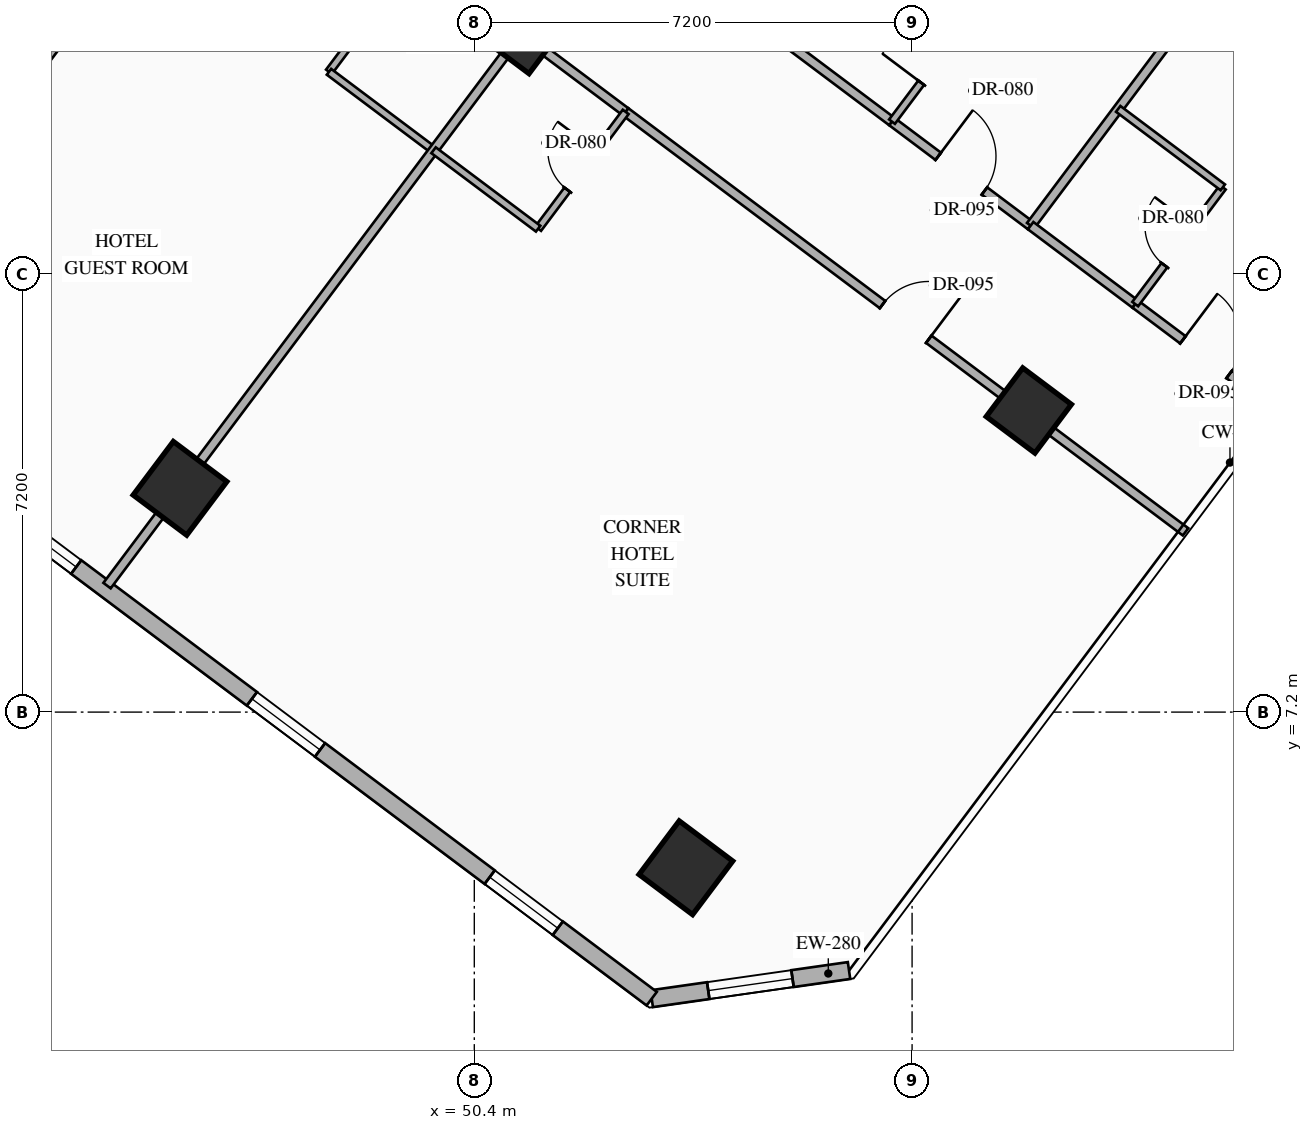
"""IFC4 building model, lengths in metres.
Left out: names, types, materials, properties, quantities, classifications, styles, units other than length and angle.
Written with IfcOpenShell. Run it as: python <this file> out.ifc"""

import sys

from ifc_helpers import new_model, si_unit, direction, frame, frame_2d, origin, origin_2d, place, context, subcontext, project, spatial, rectangle, hollow_rectangle, extrude, element, fill, save


model = new_model("IFC4")
c1 = context("Model", 3, precision=1e-05, world=origin(), true_north=direction((0.0, 1.0)))
c2 = subcontext(c1, "Body", "Model", "MODEL_VIEW")
j1 = project(units=[si_unit("LENGTHUNIT", "METRE"), si_unit("PLANEANGLEUNIT", "RADIAN")], contexts=[c1])
p1 = place(None, origin())
s1 = spatial("IfcSite", under=j1, at=p1, CompositionType="ELEMENT")
p2 = place(p1, origin())
s2 = spatial("IfcBuilding", under=s1, at=p2, CompositionType="ELEMENT")
p3 = place(p2, frame((0.0, 0.0, 56.7)))
s3 = spatial("IfcBuildingStorey", under=s2, at=p3, CompositionType="ELEMENT", Elevation=56.7)
p4 = place(p3, frame((45.56, 10.88, 0.0), z_axis=(0.0, 0.0, 1.0), x_axis=(0.799999996291, -0.600000004945, 0.0)))
e1 = element("IfcColumn", 1, at=p4, inside=s3, PredefinedType="COLUMN", context=c2, shape_type="SweptSolid", body=[
    extrude(hollow_rectangle(XDim=1.1, YDim=1.1, WallThickness=0.04, at=origin_2d()), origin(), (0.0, 0.0, 1.0), 3.35),
])
p5 = place(p3, frame((51.2, 18.4, 0.0), z_axis=(0.0, 0.0, 1.0), x_axis=(0.799999996291, -0.600000004945, 0.0)))
e2 = element("IfcColumn", 2, at=p5, inside=s3, PredefinedType="COLUMN", context=c2, shape_type="SweptSolid", body=[
    extrude(hollow_rectangle(XDim=1.0, YDim=1.0, WallThickness=0.038, at=origin_2d()), origin(), (0.0, 0.0, 1.0), 3.35),
])
p6 = place(p3, frame((53.88, 4.64, 0.0), z_axis=(0.0, 0.0, 1.0), x_axis=(0.799999996291, -0.600000004945, 0.0)))
e3 = element("IfcColumn", 3, at=p6, inside=s3, PredefinedType="COLUMN", context=c2, shape_type="SweptSolid", body=[
    extrude(hollow_rectangle(XDim=1.1, YDim=1.1, WallThickness=0.04, at=origin_2d()), origin(), (0.0, 0.0, 1.0), 3.35),
])
p7 = place(p3, frame((59.52, 12.16, 0.0), z_axis=(0.0, 0.0, 1.0), x_axis=(0.799999996291, -0.600000004945, 0.0)))
e4 = element("IfcColumn", 4, at=p7, inside=s3, PredefinedType="COLUMN", context=c2, shape_type="SweptSolid", body=[
    extrude(hollow_rectangle(XDim=1.0, YDim=1.0, WallThickness=0.038, at=origin_2d()), origin(), (0.0, 0.0, 1.0), 3.35),
])
p8 = place(p3, frame((56.563, 2.95, 0.0), z_axis=(0.0, 0.0, 1.0), x_axis=(-0.989977778067, -0.141223223777, 0.0)))
e5 = element("IfcWall", 5, at=p8, inside=s3, PredefinedType="STANDARD", context=c2, shape_type="SweptSolid", body=[
    extrude(rectangle(XDim=3.278, YDim=0.28, at=frame_2d((1.639, 0.0))), origin(), (0.0, 0.0, 1.0), 3.13),
])
p9 = place(p8, frame((0.939, 0.0, 0.85)))
e6 = element("IfcOpeningElement", 6, at=p9, cuts=e5, PredefinedType="OPENING", context=c2, shape_type="SweptSolid", body=[
    extrude(rectangle(XDim=1.4, YDim=1.8, at=frame_2d((0.7, 0.9))), frame((0.0, 0.15, 0.0), z_axis=(0.0, -1.0, 0.0), x_axis=(1.0, 0.0, 0.0)), (0.0, 0.0, 1.0), 0.3),
])
p10 = place(p3, frame((53.318, 2.487, 0.0), z_axis=(0.0, 0.0, 1.0), x_axis=(-0.800004174678, 0.599994433723, 0.0)))
e7 = element("IfcWall", 7, at=p10, inside=s3, PredefinedType="STANDARD", context=c2, shape_type="SweptSolid", body=[
    extrude(rectangle(XDim=35.089, YDim=0.28, at=frame_2d((17.544, 0.0))), origin(), (0.0, 0.0, 1.0), 3.13),
])
p11 = place(p10, frame((1.931, 0.0, 0.85)))
e8 = element("IfcOpeningElement", 8, at=p11, cuts=e7, PredefinedType="OPENING", context=c2, shape_type="SweptSolid", body=[
    extrude(rectangle(XDim=1.4, YDim=1.8, at=frame_2d((0.7, 0.9))), frame((0.0, 0.15, 0.0), z_axis=(0.0, -1.0, 0.0), x_axis=(1.0, 0.0, 0.0)), (0.0, 0.0, 1.0), 0.3),
])
p12 = place(p10, frame((6.819, 0.0, 0.85)))
e9 = element("IfcOpeningElement", 9, at=p12, cuts=e7, PredefinedType="OPENING", context=c2, shape_type="SweptSolid", body=[
    extrude(rectangle(XDim=1.4, YDim=1.8, at=frame_2d((0.7, 0.9))), frame((0.0, 0.15, 0.0), z_axis=(0.0, -1.0, 0.0), x_axis=(1.0, 0.0, 0.0)), (0.0, 0.0, 1.0), 0.3),
])
p13 = place(p10, frame((11.832, 0.0, 0.85)))
e10 = element("IfcOpeningElement", 10, at=p13, cuts=e7, PredefinedType="OPENING", context=c2, shape_type="SweptSolid", body=[
    extrude(rectangle(XDim=1.4, YDim=1.8, at=frame_2d((0.7, 0.9))), frame((0.0, 0.15, 0.0), z_axis=(0.0, -1.0, 0.0), x_axis=(1.0, 0.0, 0.0)), (0.0, 0.0, 1.0), 0.3),
])
p14 = place(p10, frame((17.647, 0.0, 0.85)))
e11 = element("IfcOpeningElement", 11, at=p14, cuts=e7, PredefinedType="OPENING", context=c2, shape_type="SweptSolid", body=[
    extrude(rectangle(XDim=1.4, YDim=1.8, at=frame_2d((0.7, 0.9))), frame((0.0, 0.15, 0.0), z_axis=(0.0, -1.0, 0.0), x_axis=(1.0, 0.0, 0.0)), (0.0, 0.0, 1.0), 0.3),
])
p15 = place(p10, frame((21.857, 0.0, 0.85)))
e12 = element("IfcOpeningElement", 12, at=p15, cuts=e7, PredefinedType="OPENING", context=c2, shape_type="SweptSolid", body=[
    extrude(rectangle(XDim=1.4, YDim=1.8, at=frame_2d((0.7, 0.9))), frame((0.0, 0.15, 0.0), z_axis=(0.0, -1.0, 0.0), x_axis=(1.0, 0.0, 0.0)), (0.0, 0.0, 1.0), 0.3),
])
p16 = place(p10, frame((26.87, 0.0, 0.85)))
e13 = element("IfcOpeningElement", 13, at=p16, cuts=e7, PredefinedType="OPENING", context=c2, shape_type="SweptSolid", body=[
    extrude(rectangle(XDim=1.4, YDim=1.8, at=frame_2d((0.7, 0.9))), frame((0.0, 0.15, 0.0), z_axis=(0.0, -1.0, 0.0), x_axis=(1.0, 0.0, 0.0)), (0.0, 0.0, 1.0), 0.3),
])
p17 = place(p10, frame((31.757, 0.0, 0.85)))
e14 = element("IfcOpeningElement", 14, at=p17, cuts=e7, PredefinedType="OPENING", context=c2, shape_type="SweptSolid", body=[
    extrude(rectangle(XDim=1.4, YDim=1.8, at=frame_2d((0.7, 0.9))), frame((0.0, 0.15, 0.0), z_axis=(0.0, -1.0, 0.0), x_axis=(1.0, 0.0, 0.0)), (0.0, 0.0, 1.0), 0.3),
])
p18 = place(p3, frame((39.464, 12.752, 0.0), z_axis=(0.0, 0.0, 1.0), x_axis=(0.6, 0.8, 0.0)))
e15 = element("IfcWall", 15, at=p18, inside=s3, PredefinedType="PARTITIONING", context=c2, shape_type="SweptSolid", body=[
    extrude(rectangle(XDim=11.51, YDim=0.15, at=frame_2d((5.755, 0.0))), origin(), (0.0, 0.0, 1.0), 3.13),
])
p19 = place(p3, frame((55.55, 18.2, 0.0), z_axis=(0.0, 0.0, 1.0), x_axis=(0.79998637334, -0.60001816845, 0.0)))
e16 = element("IfcWall", 16, at=p19, inside=s3, PredefinedType="PARTITIONING", context=c2, shape_type="SweptSolid", body=[
    extrude(rectangle(XDim=2.15, YDim=0.15, at=frame_2d((1.075, 0.0))), origin(), (0.0, 0.0, 1.0), 2.775),
])
p20 = place(p3, frame((57.27, 16.91, 0.0), z_axis=(0.0, 0.0, 1.0), x_axis=(0.800010279488, -0.599986293772, 0.0)))
e17 = element("IfcWall", 17, at=p20, inside=s3, PredefinedType="PARTITIONING", context=c2, shape_type="SweptSolid", body=[
    extrude(rectangle(XDim=2.85, YDim=0.15, at=frame_2d((1.425, 0.0))), origin(), (0.0, 0.0, 1.0), 2.775),
])
p21 = place(p20, frame((0.95, 0.0, 0.0)))
e18 = element("IfcOpeningElement", 18, at=p21, cuts=e17, PredefinedType="OPENING", context=c2, shape_type="SweptSolid", body=[
    extrude(rectangle(XDim=0.95, YDim=2.15, at=frame_2d((0.475, 1.075))), frame((0.0, 0.085, 0.0), z_axis=(0.0, -1.0, 0.0), x_axis=(1.0, 0.0, 0.0)), (0.0, 0.0, 1.0), 0.17),
])
p22 = place(p3, frame((57.27, 16.91, 0.0), z_axis=(0.0, 0.0, 1.0), x_axis=(0.599951172744, 0.800036618114, 0.0)))
e19 = element("IfcWall", 19, at=p22, inside=s3, PredefinedType="PARTITIONING", context=c2, shape_type="SweptSolid", body=[
    extrude(rectangle(XDim=2.4, YDim=0.12, at=frame_2d((1.2, 0.0))), origin(), (0.0, 0.0, 1.0), 3.13),
])
p23 = place(p22, frame((0.8, 0.0, 0.0)))
e20 = element("IfcOpeningElement", 20, at=p23, cuts=e19, PredefinedType="OPENING", context=c2, shape_type="SweptSolid", body=[
    extrude(rectangle(XDim=0.8, YDim=2.06, at=frame_2d((0.4, 1.03))), frame((0.0, 0.07, 0.0), z_axis=(0.0, -1.0, 0.0), x_axis=(1.0, 0.0, 0.0)), (0.0, 0.0, 1.0), 0.14),
])
p24 = place(p3, frame((59.55, 15.2, 0.0), z_axis=(0.0, 0.0, 1.0), x_axis=(0.599996617946, 0.80000253653, 0.0)))
e21 = element("IfcWall", 21, at=p24, inside=s3, PredefinedType="PARTITIONING", context=c2, shape_type="SweptSolid", body=[
    extrude(rectangle(XDim=11.55, YDim=0.15, at=frame_2d((5.775, 0.0))), origin(), (0.0, 0.0, 1.0), 3.13),
])
p25 = place(p3, frame((59.55, 15.2, 0.0), z_axis=(0.0, 0.0, 1.0), x_axis=(0.79998637334, -0.60001816845, 0.0)))
e22 = element("IfcWall", 22, at=p25, inside=s3, PredefinedType="PARTITIONING", context=c2, shape_type="SweptSolid", body=[
    extrude(rectangle(XDim=2.15, YDim=0.15, at=frame_2d((1.075, 0.0))), origin(), (0.0, 0.0, 1.0), 2.775),
])
p26 = place(p3, frame((61.27, 13.91, 0.0), z_axis=(0.0, 0.0, 1.0), x_axis=(0.800010068184, -0.59998657552, 0.0)))
e23 = element("IfcWall", 23, at=p26, inside=s3, PredefinedType="PARTITIONING", context=c2, shape_type="SweptSolid", body=[
    extrude(rectangle(XDim=2.91, YDim=0.15, at=frame_2d((1.455, 0.0))), origin(), (0.0, 0.0, 1.0), 3.13),
])
p27 = place(p26, frame((0.98, 0.0, 0.0)))
e24 = element("IfcOpeningElement", 24, at=p27, cuts=e23, PredefinedType="OPENING", context=c2, shape_type="SweptSolid", body=[
    extrude(rectangle(XDim=0.95, YDim=2.15, at=frame_2d((0.475, 1.075))), frame((0.0, 0.085, 0.0), z_axis=(0.0, -1.0, 0.0), x_axis=(1.0, 0.0, 0.0)), (0.0, 0.0, 1.0), 0.17),
])
p28 = place(p3, frame((61.27, 13.91, 0.0), z_axis=(0.0, 0.0, 1.0), x_axis=(0.599951172744, 0.800036618114, 0.0)))
e25 = element("IfcWall", 25, at=p28, inside=s3, PredefinedType="PARTITIONING", context=c2, shape_type="SweptSolid", body=[
    extrude(rectangle(XDim=2.4, YDim=0.12, at=frame_2d((1.2, 0.0))), origin(), (0.0, 0.0, 1.0), 3.13),
])
p29 = place(p28, frame((0.8, 0.0, 0.0)))
e26 = element("IfcOpeningElement", 26, at=p29, cuts=e25, PredefinedType="OPENING", context=c2, shape_type="SweptSolid", body=[
    extrude(rectangle(XDim=0.8, YDim=2.06, at=frame_2d((0.4, 1.03))), frame((0.0, 0.07, 0.0), z_axis=(0.0, -1.0, 0.0), x_axis=(1.0, 0.0, 0.0)), (0.0, 0.0, 1.0), 0.14),
])
p30 = place(p3, frame((60.99, 17.12, 0.0), z_axis=(0.0, 0.0, 1.0), x_axis=(0.79998637334, -0.60001816845, 0.0)))
e27 = element("IfcWall", 27, at=p30, inside=s3, PredefinedType="PARTITIONING", context=c2, shape_type="SweptSolid", body=[
    extrude(rectangle(XDim=2.15, YDim=0.12, at=frame_2d((1.075, 0.0))), origin(), (0.0, 0.0, 1.0), 3.13),
])
p31 = place(p3, frame((48.01, 17.73, 0.0), z_axis=(0.0, 0.0, 1.0), x_axis=(0.6, 0.8, 0.0)))
e28 = element("IfcWall", 28, at=p31, inside=s3, PredefinedType="PARTITIONING", context=c2, shape_type="SweptSolid", body=[
    extrude(rectangle(XDim=2.4, YDim=0.12, at=frame_2d((1.2, 0.0))), origin(), (0.0, 0.0, 1.0), 3.13),
])
p32 = place(p31, frame((0.8, 0.0, 0.0)))
e29 = element("IfcOpeningElement", 29, at=p32, cuts=e28, PredefinedType="OPENING", context=c2, shape_type="SweptSolid", body=[
    extrude(rectangle(XDim=0.8, YDim=2.06, at=frame_2d((0.4, 1.03))), frame((0.0, 0.07, 0.0), z_axis=(0.0, -1.0, 0.0), x_axis=(1.0, 0.0, 0.0)), (0.0, 0.0, 1.0), 0.14),
])
p33 = place(p3, frame((48.01, 17.73, 0.0), z_axis=(0.0, 0.0, 1.0), x_axis=(0.79998637334, -0.60001816845, 0.0)))
e30 = element("IfcWall", 30, at=p33, inside=s3, PredefinedType="PARTITIONING", context=c2, shape_type="SweptSolid", body=[
    extrude(rectangle(XDim=2.15, YDim=0.12, at=frame_2d((1.075, 0.0))), origin(), (0.0, 0.0, 1.0), 3.13),
])
p34 = place(p3, frame((44.36, 9.28, 0.0), z_axis=(0.0, 0.0, 1.0), x_axis=(0.599986233332, 0.800010324816, 0.0)))
e31 = element("IfcWall", 31, at=p34, inside=s3, PredefinedType="PARTITIONING", context=c2, shape_type="SweptSolid", body=[
    extrude(rectangle(XDim=11.35, YDim=0.15, at=frame_2d((5.675, 0.0))), origin(), (0.0, 0.0, 1.0), 2.425),
])
p35 = place(p3, frame((51.17, 18.36, 0.0), z_axis=(0.0, 0.0, 1.0), x_axis=(0.79998637334, -0.60001816845, 0.0)))
e32 = element("IfcWall", 32, at=p35, inside=s3, PredefinedType="PARTITIONING", context=c2, shape_type="SweptSolid", body=[
    extrude(rectangle(XDim=2.15, YDim=0.15, at=frame_2d((1.075, 0.0))), origin(), (0.0, 0.0, 1.0), 2.425),
])
p36 = place(p3, frame((52.89, 17.07, 0.0), z_axis=(0.0, 0.0, 1.0), x_axis=(0.8, -0.6, 0.0)))
e33 = element("IfcWall", 33, at=p36, inside=s3, PredefinedType="PARTITIONING", context=c2, shape_type="SweptSolid", body=[
    extrude(rectangle(XDim=11.51, YDim=0.15, at=frame_2d((5.755, 0.0))), origin(), (0.0, 0.0, 1.0), 2.425),
])
p37 = place(p36, frame((5.28, 0.0, 0.0)))
e34 = element("IfcOpeningElement", 34, at=p37, cuts=e33, PredefinedType="OPENING", context=c2, shape_type="SweptSolid", body=[
    extrude(rectangle(XDim=0.95, YDim=2.15, at=frame_2d((0.475, 1.075))), frame((0.0, 0.085, 0.0), z_axis=(0.0, -1.0, 0.0), x_axis=(1.0, 0.0, 0.0)), (0.0, 0.0, 1.0), 0.17),
])
p38 = place(p3, frame((51.45, 15.15, 0.0), z_axis=(0.0, 0.0, 1.0), x_axis=(0.599951172744, 0.800036618114, 0.0)))
e35 = element("IfcWall", 35, at=p38, inside=s3, PredefinedType="PARTITIONING", context=c2, shape_type="SweptSolid", body=[
    extrude(rectangle(XDim=2.4, YDim=0.12, at=frame_2d((1.2, 0.0))), origin(), (0.0, 0.0, 1.0), 3.13),
])
p39 = place(p38, frame((0.8, 0.0, 0.0)))
e36 = element("IfcOpeningElement", 36, at=p39, cuts=e35, PredefinedType="OPENING", context=c2, shape_type="SweptSolid", body=[
    extrude(rectangle(XDim=0.8, YDim=2.06, at=frame_2d((0.4, 1.03))), frame((0.0, 0.07, 0.0), z_axis=(0.0, -1.0, 0.0), x_axis=(1.0, 0.0, 0.0)), (0.0, 0.0, 1.0), 0.14),
])
p40 = place(p3, frame((49.73, 16.44, 0.0), z_axis=(0.0, 0.0, 1.0), x_axis=(0.79998637334, -0.60001816845, 0.0)))
e37 = element("IfcWall", 37, at=p40, inside=s3, PredefinedType="PARTITIONING", context=c2, shape_type="SweptSolid", body=[
    extrude(rectangle(XDim=2.15, YDim=0.12, at=frame_2d((1.075, 0.0))), origin(), (0.0, 0.0, 1.0), 3.13),
])
p41 = place(p9, origin())
e38 = element("IfcWindow", 38, at=p41, inside=s3, PartitioningType="SINGLE_PANEL", PredefinedType="WINDOW", context=c2, shape_type="SweptSolid", body=[
    extrude(rectangle(XDim=1.4, YDim=1.8, at=frame_2d((0.7, 0.9))), frame((0.0, 0.03, 0.0), z_axis=(0.0, -1.0, 0.0), x_axis=(1.0, 0.0, 0.0)), (0.0, 0.0, 1.0), 0.06),
])
fill(e6, e38)
p42 = place(p11, origin())
e39 = element("IfcWindow", 39, at=p42, inside=s3, PartitioningType="SINGLE_PANEL", PredefinedType="WINDOW", context=c2, shape_type="SweptSolid", body=[
    extrude(rectangle(XDim=1.4, YDim=1.8, at=frame_2d((0.7, 0.9))), frame((0.0, 0.03, 0.0), z_axis=(0.0, -1.0, 0.0), x_axis=(1.0, 0.0, 0.0)), (0.0, 0.0, 1.0), 0.06),
])
fill(e8, e39)
p43 = place(p12, origin())
e40 = element("IfcWindow", 40, at=p43, inside=s3, PartitioningType="SINGLE_PANEL", PredefinedType="WINDOW", context=c2, shape_type="SweptSolid", body=[
    extrude(rectangle(XDim=1.4, YDim=1.8, at=frame_2d((0.7, 0.9))), frame((0.0, 0.03, 0.0), z_axis=(0.0, -1.0, 0.0), x_axis=(1.0, 0.0, 0.0)), (0.0, 0.0, 1.0), 0.06),
])
fill(e9, e40)
p44 = place(p13, origin())
e41 = element("IfcWindow", 41, at=p44, inside=s3, PartitioningType="SINGLE_PANEL", PredefinedType="WINDOW", context=c2, shape_type="SweptSolid", body=[
    extrude(rectangle(XDim=1.4, YDim=1.8, at=frame_2d((0.7, 0.9))), frame((0.0, 0.03, 0.0), z_axis=(0.0, -1.0, 0.0), x_axis=(1.0, 0.0, 0.0)), (0.0, 0.0, 1.0), 0.06),
])
fill(e10, e41)
p45 = place(p21, origin())
e42 = element("IfcDoor", 42, at=p45, inside=s3, OperationType="SINGLE_SWING_LEFT", PredefinedType="DOOR", context=c2, shape_type="SweptSolid", body=[
    extrude(rectangle(XDim=0.95, YDim=2.15, at=frame_2d((0.475, 1.075))), frame((0.0, 0.025, 0.0), z_axis=(0.0, -1.0, 0.0), x_axis=(1.0, 0.0, 0.0)), (0.0, 0.0, 1.0), 0.05),
])
fill(e18, e42)
p46 = place(p23, origin())
e43 = element("IfcDoor", 43, at=p46, inside=s3, OperationType="SINGLE_SWING_LEFT", PredefinedType="DOOR", context=c2, shape_type="SweptSolid", body=[
    extrude(rectangle(XDim=0.8, YDim=2.06, at=frame_2d((0.4, 1.03))), frame((0.0, 0.025, 0.0), z_axis=(0.0, -1.0, 0.0), x_axis=(1.0, 0.0, 0.0)), (0.0, 0.0, 1.0), 0.05),
])
fill(e20, e43)
p47 = place(p27, origin())
e44 = element("IfcDoor", 44, at=p47, inside=s3, OperationType="SINGLE_SWING_LEFT", PredefinedType="DOOR", context=c2, shape_type="SweptSolid", body=[
    extrude(rectangle(XDim=0.95, YDim=2.15, at=frame_2d((0.475, 1.075))), frame((0.0, 0.025, 0.0), z_axis=(0.0, -1.0, 0.0), x_axis=(1.0, 0.0, 0.0)), (0.0, 0.0, 1.0), 0.05),
])
fill(e24, e44)
p48 = place(p29, origin())
e45 = element("IfcDoor", 45, at=p48, inside=s3, OperationType="SINGLE_SWING_RIGHT", PredefinedType="DOOR", context=c2, shape_type="SweptSolid", body=[
    extrude(rectangle(XDim=0.8, YDim=2.06, at=frame_2d((0.4, 1.03))), frame((0.0, 0.025, 0.0), z_axis=(0.0, -1.0, 0.0), x_axis=(1.0, 0.0, 0.0)), (0.0, 0.0, 1.0), 0.05),
])
fill(e26, e45)
p49 = place(p37, origin())
e46 = element("IfcDoor", 46, at=p49, inside=s3, OperationType="SINGLE_SWING_RIGHT", PredefinedType="DOOR", context=c2, shape_type="SweptSolid", body=[
    extrude(rectangle(XDim=0.95, YDim=2.15, at=frame_2d((0.475, 1.075))), frame((0.0, 0.025, 0.0), z_axis=(0.0, -1.0, 0.0), x_axis=(1.0, 0.0, 0.0)), (0.0, 0.0, 1.0), 0.05),
])
fill(e34, e46)
p50 = place(p39, origin())
e47 = element("IfcDoor", 47, at=p50, inside=s3, OperationType="SINGLE_SWING_RIGHT", PredefinedType="DOOR", context=c2, shape_type="SweptSolid", body=[
    extrude(rectangle(XDim=0.8, YDim=2.06, at=frame_2d((0.4, 1.03))), frame((0.0, 0.025, 0.0), z_axis=(0.0, -1.0, 0.0), x_axis=(1.0, 0.0, 0.0)), (0.0, 0.0, 1.0), 0.05),
])
fill(e36, e47)
save(model, sys.argv[1])
